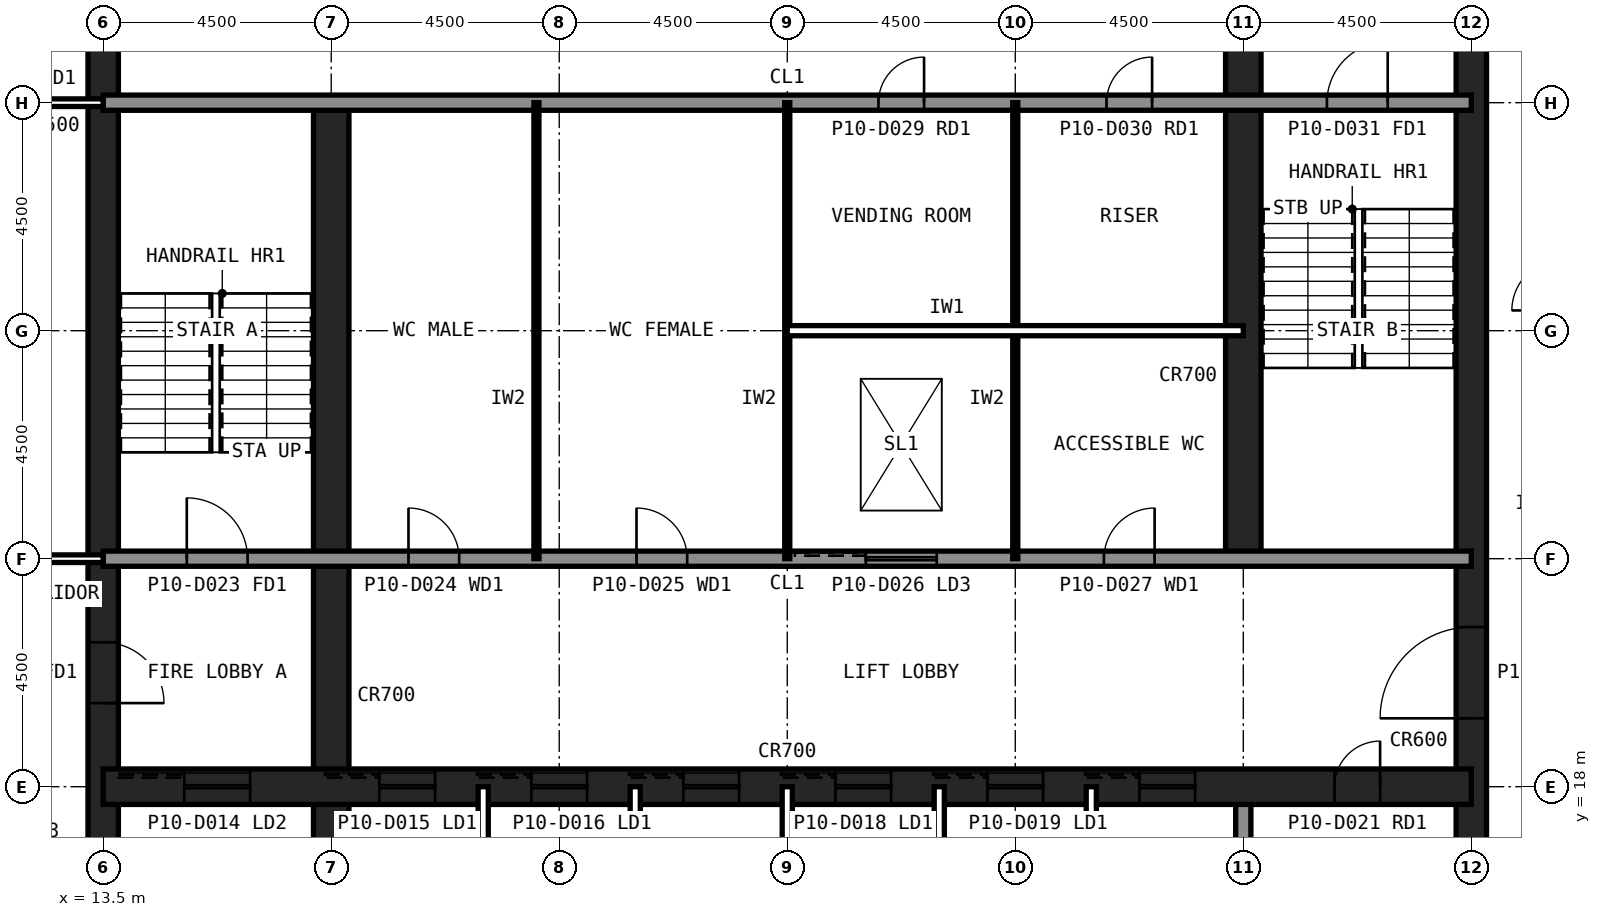
"""IFC4 building model, lengths in metres.
Left out: names, types, materials, properties, quantities, classifications, styles, units other than length and angle.
Written with IfcOpenShell. Run it as: python <this file> out.ifc"""

import sys

from ifc_helpers import new_model, si_unit, direction, frame, frame_2d, origin, place, context, subcontext, project, spatial, rectangle, extrude, element, fill, save


model = new_model("IFC4")
c1 = context("Model", 3, precision=1e-05, world=origin(), true_north=direction((0.0, 1.0)))
c2 = subcontext(c1, "Body", "Model", "MODEL_VIEW")
j1 = project(units=[si_unit("LENGTHUNIT", "METRE"), si_unit("PLANEANGLEUNIT", "RADIAN")], contexts=[c1])
p1 = place(None, origin())
s1 = spatial("IfcSite", under=j1, at=p1, CompositionType="ELEMENT")
p2 = place(p1, origin())
s2 = spatial("IfcBuilding", under=s1, at=p2, CompositionType="ELEMENT")
p3 = place(p2, frame((0.0, 0.0, 45.8)))
s3 = spatial("IfcBuildingStorey", under=s2, at=p3, CompositionType="ELEMENT", Elevation=45.8)
p4 = place(p3, frame((40.5, 13.5, 0.0), z_axis=(0.0, 0.0, 1.0), x_axis=(0.0, 1.0, 0.0)))
e1 = element("IfcWall", 1, at=p4, inside=s3, PredefinedType="SHEAR", context=c2, shape_type="SweptSolid", body=[
    extrude(rectangle(XDim=27.0, YDim=0.6, at=frame_2d((13.5, 0.0))), origin(), (0.0, 0.0, 1.0), 4.2),
])
p5 = place(p4, frame((5.85, 0.0, 0.0)))
e2 = element("IfcOpeningElement", 2, at=p5, cuts=e1, PredefinedType="OPENING", context=c2, shape_type="SweptSolid", body=[
    extrude(rectangle(XDim=1.8, YDim=2.1, at=frame_2d((0.9, 1.05))), frame((0.0, 0.31, 0.0), z_axis=(0.0, -1.0, 0.0), x_axis=(1.0, 0.0, 0.0)), (0.0, 0.0, 1.0), 0.62),
])
p6 = place(p4, frame((19.65, 0.0, 0.0)))
e3 = element("IfcOpeningElement", 3, at=p6, cuts=e1, PredefinedType="OPENING", context=c2, shape_type="SweptSolid", body=[
    extrude(rectangle(XDim=1.2, YDim=2.1, at=frame_2d((0.6, 1.05))), frame((0.0, 0.31, 0.0), z_axis=(0.0, -1.0, 0.0), x_axis=(1.0, 0.0, 0.0)), (0.0, 0.0, 1.0), 0.62),
])
p7 = place(p3, frame((13.5, 40.5, 0.0), z_axis=(0.0, 0.0, 1.0), x_axis=(0.0, -1.0, 0.0)))
e4 = element("IfcWall", 4, at=p7, inside=s3, PredefinedType="SHEAR", context=c2, shape_type="SweptSolid", body=[
    extrude(rectangle(XDim=27.0, YDim=0.6, at=frame_2d((13.5, 0.0))), origin(), (0.0, 0.0, 1.0), 4.2),
])
p8 = place(p7, frame((19.65, 0.0, 0.0)))
e5 = element("IfcOpeningElement", 5, at=p8, cuts=e4, PredefinedType="OPENING", context=c2, shape_type="SweptSolid", body=[
    extrude(rectangle(XDim=1.2, YDim=2.1, at=frame_2d((0.6, 1.05))), frame((0.0, 0.31, 0.0), z_axis=(0.0, -1.0, 0.0), x_axis=(1.0, 0.0, 0.0)), (0.0, 0.0, 1.0), 0.62),
])
p9 = place(p7, frame((5.85, 0.0, 0.0)))
e6 = element("IfcOpeningElement", 6, at=p9, cuts=e4, PredefinedType="OPENING", context=c2, shape_type="SweptSolid", body=[
    extrude(rectangle(XDim=1.8, YDim=2.1, at=frame_2d((0.9, 1.05))), frame((0.0, 0.31, 0.0), z_axis=(0.0, -1.0, 0.0), x_axis=(1.0, 0.0, 0.0)), (0.0, 0.0, 1.0), 0.62),
])
p10 = place(p3, frame((18.0, 13.5, 0.0), z_axis=(0.0, 0.0, 1.0), x_axis=(0.0, 1.0, 0.0)))
e7 = element("IfcWall", 7, at=p10, inside=s3, PredefinedType="SHEAR", context=c2, shape_type="SweptSolid", body=[
    extrude(rectangle(XDim=18.0, YDim=0.7, at=frame_2d((9.0, 0.0))), origin(), (0.0, 0.0, 1.0), 4.2),
])
p11 = place(p3, frame((36.0, 13.5, 0.0), z_axis=(0.0, 0.0, 1.0), x_axis=(0.0, 1.0, 0.0)))
e8 = element("IfcWall", 8, at=p11, inside=s3, PredefinedType="SOLIDWALL", context=c2, shape_type="SweptSolid", body=[
    extrude(rectangle(XDim=4.5, YDim=0.3, at=frame_2d((2.25, 0.0))), origin(), (0.0, 0.0, 1.0), 4.04),
])
p12 = place(p3, frame((36.0, 22.5, 0.0), z_axis=(0.0, 0.0, 1.0), x_axis=(0.0, 1.0, 0.0)))
e9 = element("IfcWall", 9, at=p12, inside=s3, PredefinedType="SHEAR", context=c2, shape_type="SweptSolid", body=[
    extrude(rectangle(XDim=18.0, YDim=0.7, at=frame_2d((9.0, 0.0))), origin(), (0.0, 0.0, 1.0), 4.2),
])
p13 = place(p3, frame((13.5, 18.0, 0.0), z_axis=(0.0, 0.0, 1.0), x_axis=(1.0, 0.0, 0.0)))
e10 = element("IfcWall", 10, at=p13, inside=s3, PredefinedType="SHEAR", context=c2, shape_type="SweptSolid", body=[
    extrude(rectangle(XDim=27.0, YDim=0.7, at=frame_2d((13.5, 0.0))), origin(), (0.0, 0.0, 1.0), 4.2),
])
p14 = place(p13, frame((24.3, 0.0, 0.0)))
e11 = element("IfcOpeningElement", 11, at=p14, cuts=e10, PredefinedType="OPENING", context=c2, shape_type="SweptSolid", body=[
    extrude(rectangle(XDim=0.9, YDim=2.1, at=frame_2d((0.45, 1.05))), frame((0.0, 0.36, 0.0), z_axis=(0.0, -1.0, 0.0), x_axis=(1.0, 0.0, 0.0)), (0.0, 0.0, 1.0), 0.72),
])
p15 = place(p13, frame((5.45, 0.0, 0.0)))
e12 = element("IfcOpeningElement", 12, at=p15, cuts=e10, PredefinedType="OPENING", context=c2, shape_type="SweptSolid", body=[
    extrude(rectangle(XDim=1.1, YDim=2.1, at=frame_2d((0.55, 1.05))), frame((0.0, 0.36, 0.0), z_axis=(0.0, -1.0, 0.0), x_axis=(1.0, 0.0, 0.0)), (0.0, 0.0, 1.0), 0.72),
])
p16 = place(p13, frame((8.45, 0.0, 0.0)))
e13 = element("IfcOpeningElement", 13, at=p16, cuts=e10, PredefinedType="OPENING", context=c2, shape_type="SweptSolid", body=[
    extrude(rectangle(XDim=1.1, YDim=2.1, at=frame_2d((0.55, 1.05))), frame((0.0, 0.36, 0.0), z_axis=(0.0, -1.0, 0.0), x_axis=(1.0, 0.0, 0.0)), (0.0, 0.0, 1.0), 0.72),
])
p17 = place(p13, frame((11.45, 0.0, 0.0)))
e14 = element("IfcOpeningElement", 14, at=p17, cuts=e10, PredefinedType="OPENING", context=c2, shape_type="SweptSolid", body=[
    extrude(rectangle(XDim=1.1, YDim=2.1, at=frame_2d((0.55, 1.05))), frame((0.0, 0.36, 0.0), z_axis=(0.0, -1.0, 0.0), x_axis=(1.0, 0.0, 0.0)), (0.0, 0.0, 1.0), 0.72),
])
p18 = place(p13, frame((14.45, 0.0, 0.0)))
e15 = element("IfcOpeningElement", 15, at=p18, cuts=e10, PredefinedType="OPENING", context=c2, shape_type="SweptSolid", body=[
    extrude(rectangle(XDim=1.1, YDim=2.1, at=frame_2d((0.55, 1.05))), frame((0.0, 0.36, 0.0), z_axis=(0.0, -1.0, 0.0), x_axis=(1.0, 0.0, 0.0)), (0.0, 0.0, 1.0), 0.72),
])
p19 = place(p13, frame((17.45, 0.0, 0.0)))
e16 = element("IfcOpeningElement", 16, at=p19, cuts=e10, PredefinedType="OPENING", context=c2, shape_type="SweptSolid", body=[
    extrude(rectangle(XDim=1.1, YDim=2.1, at=frame_2d((0.55, 1.05))), frame((0.0, 0.36, 0.0), z_axis=(0.0, -1.0, 0.0), x_axis=(1.0, 0.0, 0.0)), (0.0, 0.0, 1.0), 0.72),
])
p20 = place(p13, frame((20.45, 0.0, 0.0)))
e17 = element("IfcOpeningElement", 17, at=p20, cuts=e10, PredefinedType="OPENING", context=c2, shape_type="SweptSolid", body=[
    extrude(rectangle(XDim=1.1, YDim=2.1, at=frame_2d((0.55, 1.05))), frame((0.0, 0.36, 0.0), z_axis=(0.0, -1.0, 0.0), x_axis=(1.0, 0.0, 0.0)), (0.0, 0.0, 1.0), 0.72),
])
p21 = place(p13, frame((1.6, 0.0, 0.0)))
e18 = element("IfcOpeningElement", 18, at=p21, cuts=e10, PredefinedType="OPENING", context=c2, shape_type="SweptSolid", body=[
    extrude(rectangle(XDim=1.3, YDim=2.2, at=frame_2d((0.65, 1.1))), frame((0.0, 0.36, 0.0), z_axis=(0.0, -1.0, 0.0), x_axis=(1.0, 0.0, 0.0)), (0.0, 0.0, 1.0), 0.72),
])
p22 = place(p3, frame((13.5, 22.5, 0.0), z_axis=(0.0, 0.0, 1.0), x_axis=(1.0, 0.0, 0.0)))
e19 = element("IfcWall", 19, at=p22, inside=s3, PredefinedType="SOLIDWALL", context=c2, shape_type="SweptSolid", body=[
    extrude(rectangle(XDim=27.0, YDim=0.3, at=frame_2d((13.5, 0.0))), origin(), (0.0, 0.0, 1.0), 4.04),
])
p23 = place(p22, frame((1.65, 0.0, 0.0)))
e20 = element("IfcOpeningElement", 20, at=p23, cuts=e19, PredefinedType="OPENING", context=c2, shape_type="SweptSolid", body=[
    extrude(rectangle(XDim=1.2, YDim=2.1, at=frame_2d((0.6, 1.05))), frame((0.0, 0.16, 0.0), z_axis=(0.0, -1.0, 0.0), x_axis=(1.0, 0.0, 0.0)), (0.0, 0.0, 1.0), 0.32),
])
p24 = place(p22, frame((6.025, 0.0, 0.0)))
e21 = element("IfcOpeningElement", 21, at=p24, cuts=e19, PredefinedType="OPENING", context=c2, shape_type="SweptSolid", body=[
    extrude(rectangle(XDim=1.0, YDim=2.1, at=frame_2d((0.5, 1.05))), frame((0.0, 0.16, 0.0), z_axis=(0.0, -1.0, 0.0), x_axis=(1.0, 0.0, 0.0)), (0.0, 0.0, 1.0), 0.32),
])
p25 = place(p22, frame((10.525, 0.0, 0.0)))
e22 = element("IfcOpeningElement", 22, at=p25, cuts=e19, PredefinedType="OPENING", context=c2, shape_type="SweptSolid", body=[
    extrude(rectangle(XDim=1.0, YDim=2.1, at=frame_2d((0.5, 1.05))), frame((0.0, 0.16, 0.0), z_axis=(0.0, -1.0, 0.0), x_axis=(1.0, 0.0, 0.0)), (0.0, 0.0, 1.0), 0.32),
])
p26 = place(p22, frame((19.75, 0.0, 0.0)))
e23 = element("IfcOpeningElement", 23, at=p26, cuts=e19, PredefinedType="OPENING", context=c2, shape_type="SweptSolid", body=[
    extrude(rectangle(XDim=1.0, YDim=2.1, at=frame_2d((0.5, 1.05))), frame((0.0, 0.16, 0.0), z_axis=(0.0, -1.0, 0.0), x_axis=(1.0, 0.0, 0.0)), (0.0, 0.0, 1.0), 0.32),
])
p27 = place(p22, frame((15.05, 0.0, 0.0)))
e24 = element("IfcOpeningElement", 24, at=p27, cuts=e19, PredefinedType="OPENING", context=c2, shape_type="SweptSolid", body=[
    extrude(rectangle(XDim=1.4, YDim=2.4, at=frame_2d((0.7, 1.2))), frame((0.0, 0.16, 0.0), z_axis=(0.0, -1.0, 0.0), x_axis=(1.0, 0.0, 0.0)), (0.0, 0.0, 1.0), 0.32),
])
p28 = place(p3, frame((13.5, 31.5, 0.0), z_axis=(0.0, 0.0, 1.0), x_axis=(1.0, 0.0, 0.0)))
e25 = element("IfcWall", 25, at=p28, inside=s3, PredefinedType="SOLIDWALL", context=c2, shape_type="SweptSolid", body=[
    extrude(rectangle(XDim=27.0, YDim=0.3, at=frame_2d((13.5, 0.0))), origin(), (0.0, 0.0, 1.0), 4.04),
])
p29 = place(p28, frame((24.15, 0.0, 0.0)))
e26 = element("IfcOpeningElement", 26, at=p29, cuts=e25, PredefinedType="OPENING", context=c2, shape_type="SweptSolid", body=[
    extrude(rectangle(XDim=1.2, YDim=2.1, at=frame_2d((0.6, 1.05))), frame((0.0, 0.16, 0.0), z_axis=(0.0, -1.0, 0.0), x_axis=(1.0, 0.0, 0.0)), (0.0, 0.0, 1.0), 0.32),
])
p30 = place(p28, frame((15.3, 0.0, 0.0)))
e27 = element("IfcOpeningElement", 27, at=p30, cuts=e25, PredefinedType="OPENING", context=c2, shape_type="SweptSolid", body=[
    extrude(rectangle(XDim=0.9, YDim=2.1, at=frame_2d((0.45, 1.05))), frame((0.0, 0.16, 0.0), z_axis=(0.0, -1.0, 0.0), x_axis=(1.0, 0.0, 0.0)), (0.0, 0.0, 1.0), 0.32),
])
p31 = place(p28, frame((19.8, 0.0, 0.0)))
e28 = element("IfcOpeningElement", 28, at=p31, cuts=e25, PredefinedType="OPENING", context=c2, shape_type="SweptSolid", body=[
    extrude(rectangle(XDim=0.9, YDim=2.1, at=frame_2d((0.45, 1.05))), frame((0.0, 0.16, 0.0), z_axis=(0.0, -1.0, 0.0), x_axis=(1.0, 0.0, 0.0)), (0.0, 0.0, 1.0), 0.32),
])
for number, where, z_axis, x_axis in (
    (29, (21.0, 13.5, 0.0), (0.0, 0.0, 1.0), (0.0, 1.0, 0.0)),
    (30, (24.0, 13.5, 0.0), (0.0, 0.0, 1.0), (0.0, 1.0, 0.0)),
    (31, (27.0, 13.5, 0.0), (0.0, 0.0, 1.0), (0.0, 1.0, 0.0)),
    (32, (30.0, 13.5, 0.0), (0.0, 0.0, 1.0), (0.0, 1.0, 0.0)),
    (33, (33.0, 13.5, 0.0), (0.0, 0.0, 1.0), (0.0, 1.0, 0.0)),
):
    element("IfcWall", number, at=place(p3, frame(where, z_axis=z_axis, x_axis=x_axis)), inside=s3, PredefinedType="PARTITIONING", context=c2, shape_type="SweptSolid", body=[
        extrude(rectangle(XDim=4.5, YDim=0.2, at=frame_2d((2.25, 0.0))), origin(), (0.0, 0.0, 1.0), 4.04),
    ])
for number, where, z_axis, x_axis in (
    (34, (22.05, 22.5, 0.0), (0.0, 0.0, 1.0), (0.0, 1.0, 0.0)),
    (35, (27.0, 22.5, 0.0), (0.0, 0.0, 1.0), (0.0, 1.0, 0.0)),
    (36, (31.5, 22.5, 0.0), (0.0, 0.0, 1.0), (0.0, 1.0, 0.0)),
):
    element("IfcWall", number, at=place(p3, frame(where, z_axis=z_axis, x_axis=x_axis)), inside=s3, PredefinedType="PLUMBINGWALL", context=c2, shape_type="SweptSolid", body=[
        extrude(rectangle(XDim=9.0, YDim=0.1, at=frame_2d((4.5, 0.0))), origin(), (0.0, 0.0, 1.0), 4.04),
    ])
p32 = place(p3, frame((27.0, 27.0, 0.0), z_axis=(0.0, 0.0, 1.0), x_axis=(1.0, 0.0, 0.0)))
e37 = element("IfcWall", 37, at=p32, inside=s3, PredefinedType="PARTITIONING", context=c2, shape_type="SweptSolid", body=[
    extrude(rectangle(XDim=9.0, YDim=0.2, at=frame_2d((4.5, 0.0))), origin(), (0.0, 0.0, 1.0), 4.04),
])
p33 = place(p3, frame((9.9, 22.5, 0.0), z_axis=(0.0, 0.0, 1.0), x_axis=(1.0, 0.0, 0.0)))
e38 = element("IfcWall", 38, at=p33, inside=s3, PredefinedType="PARTITIONING", context=c2, shape_type="SweptSolid", body=[
    extrude(rectangle(XDim=3.6, YDim=0.15, at=frame_2d((1.8, 0.0))), origin(), (0.0, 0.0, 1.0), 3.189),
])
p34 = place(p3, frame((13.5, 31.5, 0.0), z_axis=(0.0, 0.0, 1.0), x_axis=(-1.0, 0.0, 0.0)))
e39 = element("IfcWall", 39, at=p34, inside=s3, PredefinedType="PARTITIONING", context=c2, shape_type="SweptSolid", body=[
    extrude(rectangle(XDim=3.6, YDim=0.15, at=frame_2d((1.8, 0.0))), origin(), (0.0, 0.0, 1.0), 3.189),
])
p35 = place(p34, frame((1.3, 0.0, 0.0)))
e40 = element("IfcOpeningElement", 40, at=p35, cuts=e39, PredefinedType="OPENING", context=c2, shape_type="SweptSolid", body=[
    extrude(rectangle(XDim=1.0, YDim=2.1, at=frame_2d((0.5, 1.05))), frame((0.0, 0.085, 0.0), z_axis=(0.0, -1.0, 0.0), x_axis=(1.0, 0.0, 0.0)), (0.0, 0.0, 1.0), 0.17),
])
p36 = place(p8, origin())
e41 = element("IfcDoor", 41, at=p36, inside=s3, OperationType="SINGLE_SWING_RIGHT", PredefinedType="DOOR", context=c2, shape_type="SweptSolid", body=[
    extrude(rectangle(XDim=1.2, YDim=2.1, at=frame_2d((0.6, 1.05))), frame((0.0, 0.025, 0.0), z_axis=(0.0, -1.0, 0.0), x_axis=(1.0, 0.0, 0.0)), (0.0, 0.0, 1.0), 0.05),
])
fill(e5, e41)
p37 = place(p5, origin())
e42 = element("IfcDoor", 42, at=p37, inside=s3, OperationType="SINGLE_SWING_LEFT", PredefinedType="DOOR", context=c2, shape_type="SweptSolid", body=[
    extrude(rectangle(XDim=1.8, YDim=2.1, at=frame_2d((0.9, 1.05))), frame((0.0, 0.025, 0.0), z_axis=(0.0, -1.0, 0.0), x_axis=(1.0, 0.0, 0.0)), (0.0, 0.0, 1.0), 0.05),
])
fill(e2, e42)
p38 = place(p23, origin())
e43 = element("IfcDoor", 43, at=p38, inside=s3, OperationType="SINGLE_SWING_LEFT", PredefinedType="DOOR", context=c2, shape_type="SweptSolid", body=[
    extrude(rectangle(XDim=1.2, YDim=2.1, at=frame_2d((0.6, 1.05))), frame((0.0, 0.025, 0.0), z_axis=(0.0, -1.0, 0.0), x_axis=(1.0, 0.0, 0.0)), (0.0, 0.0, 1.0), 0.05),
])
fill(e20, e43)
p39 = place(p29, origin())
e44 = element("IfcDoor", 44, at=p39, inside=s3, OperationType="SINGLE_SWING_RIGHT", PredefinedType="DOOR", context=c2, shape_type="SweptSolid", body=[
    extrude(rectangle(XDim=1.2, YDim=2.1, at=frame_2d((0.6, 1.05))), frame((0.0, 0.025, 0.0), z_axis=(0.0, -1.0, 0.0), x_axis=(1.0, 0.0, 0.0)), (0.0, 0.0, 1.0), 0.05),
])
fill(e26, e44)
p40 = place(p24, origin())
e45 = element("IfcDoor", 45, at=p40, inside=s3, OperationType="SINGLE_SWING_LEFT", PredefinedType="DOOR", context=c2, shape_type="SweptSolid", body=[
    extrude(rectangle(XDim=1.0, YDim=2.1, at=frame_2d((0.5, 1.05))), frame((0.0, 0.025, 0.0), z_axis=(0.0, -1.0, 0.0), x_axis=(1.0, 0.0, 0.0)), (0.0, 0.0, 1.0), 0.05),
])
fill(e21, e45)
p41 = place(p25, origin())
e46 = element("IfcDoor", 46, at=p41, inside=s3, OperationType="SINGLE_SWING_LEFT", PredefinedType="DOOR", context=c2, shape_type="SweptSolid", body=[
    extrude(rectangle(XDim=1.0, YDim=2.1, at=frame_2d((0.5, 1.05))), frame((0.0, 0.025, 0.0), z_axis=(0.0, -1.0, 0.0), x_axis=(1.0, 0.0, 0.0)), (0.0, 0.0, 1.0), 0.05),
])
fill(e22, e46)
p42 = place(p26, origin())
e47 = element("IfcDoor", 47, at=p42, inside=s3, OperationType="SINGLE_SWING_RIGHT", PredefinedType="DOOR", context=c2, shape_type="SweptSolid", body=[
    extrude(rectangle(XDim=1.0, YDim=2.1, at=frame_2d((0.5, 1.05))), frame((0.0, 0.025, 0.0), z_axis=(0.0, -1.0, 0.0), x_axis=(1.0, 0.0, 0.0)), (0.0, 0.0, 1.0), 0.05),
])
fill(e23, e47)
p43 = place(p30, origin())
e48 = element("IfcDoor", 48, at=p43, inside=s3, OperationType="SINGLE_SWING_RIGHT", PredefinedType="DOOR", context=c2, shape_type="SweptSolid", body=[
    extrude(rectangle(XDim=0.9, YDim=2.1, at=frame_2d((0.45, 1.05))), frame((0.0, 0.025, 0.0), z_axis=(0.0, -1.0, 0.0), x_axis=(1.0, 0.0, 0.0)), (0.0, 0.0, 1.0), 0.05),
])
fill(e27, e48)
p44 = place(p31, origin())
e49 = element("IfcDoor", 49, at=p44, inside=s3, OperationType="SINGLE_SWING_RIGHT", PredefinedType="DOOR", context=c2, shape_type="SweptSolid", body=[
    extrude(rectangle(XDim=0.9, YDim=2.1, at=frame_2d((0.45, 1.05))), frame((0.0, 0.025, 0.0), z_axis=(0.0, -1.0, 0.0), x_axis=(1.0, 0.0, 0.0)), (0.0, 0.0, 1.0), 0.05),
])
fill(e28, e49)
p45 = place(p14, origin())
e50 = element("IfcDoor", 50, at=p45, inside=s3, OperationType="SINGLE_SWING_RIGHT", PredefinedType="DOOR", context=c2, shape_type="SweptSolid", body=[
    extrude(rectangle(XDim=0.9, YDim=2.1, at=frame_2d((0.45, 1.05))), frame((0.0, 0.025, 0.0), z_axis=(0.0, -1.0, 0.0), x_axis=(1.0, 0.0, 0.0)), (0.0, 0.0, 1.0), 0.05),
])
fill(e11, e50)
p46 = place(p15, origin())
e51 = element("IfcDoor", 51, at=p46, inside=s3, OperationType="SLIDING_TO_LEFT", PredefinedType="DOOR", context=c2, shape_type="SweptSolid", body=[
    extrude(rectangle(XDim=1.1, YDim=2.1, at=frame_2d((0.55, 1.05))), frame((0.0, 0.025, 0.0), z_axis=(0.0, -1.0, 0.0), x_axis=(1.0, 0.0, 0.0)), (0.0, 0.0, 1.0), 0.05),
])
fill(e12, e51)
p47 = place(p16, origin())
e52 = element("IfcDoor", 52, at=p47, inside=s3, OperationType="SLIDING_TO_LEFT", PredefinedType="DOOR", context=c2, shape_type="SweptSolid", body=[
    extrude(rectangle(XDim=1.1, YDim=2.1, at=frame_2d((0.55, 1.05))), frame((0.0, 0.025, 0.0), z_axis=(0.0, -1.0, 0.0), x_axis=(1.0, 0.0, 0.0)), (0.0, 0.0, 1.0), 0.05),
])
fill(e13, e52)
p48 = place(p17, origin())
e53 = element("IfcDoor", 53, at=p48, inside=s3, OperationType="SLIDING_TO_LEFT", PredefinedType="DOOR", context=c2, shape_type="SweptSolid", body=[
    extrude(rectangle(XDim=1.1, YDim=2.1, at=frame_2d((0.55, 1.05))), frame((0.0, 0.025, 0.0), z_axis=(0.0, -1.0, 0.0), x_axis=(1.0, 0.0, 0.0)), (0.0, 0.0, 1.0), 0.05),
])
fill(e14, e53)
p49 = place(p18, origin())
e54 = element("IfcDoor", 54, at=p49, inside=s3, OperationType="SLIDING_TO_LEFT", PredefinedType="DOOR", context=c2, shape_type="SweptSolid", body=[
    extrude(rectangle(XDim=1.1, YDim=2.1, at=frame_2d((0.55, 1.05))), frame((0.0, 0.025, 0.0), z_axis=(0.0, -1.0, 0.0), x_axis=(1.0, 0.0, 0.0)), (0.0, 0.0, 1.0), 0.05),
])
fill(e15, e54)
p50 = place(p19, origin())
e55 = element("IfcDoor", 55, at=p50, inside=s3, OperationType="SLIDING_TO_LEFT", PredefinedType="DOOR", context=c2, shape_type="SweptSolid", body=[
    extrude(rectangle(XDim=1.1, YDim=2.1, at=frame_2d((0.55, 1.05))), frame((0.0, 0.025, 0.0), z_axis=(0.0, -1.0, 0.0), x_axis=(1.0, 0.0, 0.0)), (0.0, 0.0, 1.0), 0.05),
])
fill(e16, e55)
p51 = place(p20, origin())
e56 = element("IfcDoor", 56, at=p51, inside=s3, OperationType="SLIDING_TO_LEFT", PredefinedType="DOOR", context=c2, shape_type="SweptSolid", body=[
    extrude(rectangle(XDim=1.1, YDim=2.1, at=frame_2d((0.55, 1.05))), frame((0.0, 0.025, 0.0), z_axis=(0.0, -1.0, 0.0), x_axis=(1.0, 0.0, 0.0)), (0.0, 0.0, 1.0), 0.05),
])
fill(e17, e56)
p52 = place(p21, origin())
e57 = element("IfcDoor", 57, at=p52, inside=s3, OperationType="SLIDING_TO_LEFT", PredefinedType="DOOR", context=c2, shape_type="SweptSolid", body=[
    extrude(rectangle(XDim=1.3, YDim=2.2, at=frame_2d((0.65, 1.1))), frame((0.0, 0.025, 0.0), z_axis=(0.0, -1.0, 0.0), x_axis=(1.0, 0.0, 0.0)), (0.0, 0.0, 1.0), 0.05),
])
fill(e18, e57)
p53 = place(p27, origin())
e58 = element("IfcDoor", 58, at=p53, inside=s3, OperationType="SLIDING_TO_LEFT", PredefinedType="DOOR", context=c2, shape_type="SweptSolid", body=[
    extrude(rectangle(XDim=1.4, YDim=2.4, at=frame_2d((0.7, 1.2))), frame((0.0, 0.025, 0.0), z_axis=(0.0, -1.0, 0.0), x_axis=(1.0, 0.0, 0.0)), (0.0, 0.0, 1.0), 0.05),
])
fill(e24, e58)
save(model, sys.argv[1])
